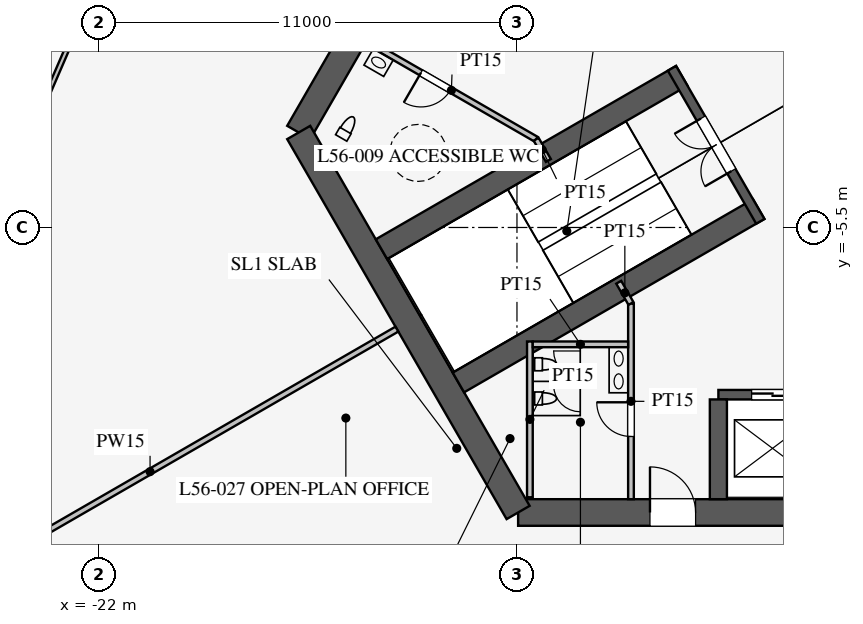
"""IFC4 building model, lengths in metres.
Left out: names, types, materials, properties, quantities, classifications, styles, units other than length and angle.
Written with IfcOpenShell. Run it as: python <this file> out.ifc"""

import sys

from ifc_helpers import new_model, si_unit, direction, frame, frame_2d, origin, place, context, subcontext, project, spatial, rectangle, extrude, element, fill, save


model = new_model("IFC4")
c1 = context("Model", 3, precision=1e-05, world=origin(), true_north=direction((0.0, 1.0)))
c2 = subcontext(c1, "Body", "Model", "MODEL_VIEW")
j1 = project(units=[si_unit("LENGTHUNIT", "METRE"), si_unit("PLANEANGLEUNIT", "RADIAN")], contexts=[c1])
p1 = place(None, origin())
s1 = spatial("IfcSite", under=j1, at=p1, CompositionType="ELEMENT")
p2 = place(p1, origin())
s2 = spatial("IfcBuilding", under=s1, at=p2, CompositionType="ELEMENT")
p3 = place(p2, frame((0.0, 0.0, 244.3)))
s3 = spatial("IfcBuildingStorey", under=s2, at=p3, CompositionType="ELEMENT", Elevation=244.3)
p4 = place(p3, frame((-10.97, -13.0, 0.0), z_axis=(0.0, 0.0, 1.0), x_axis=(1.0, 0.0, 0.0)))
e1 = element("IfcWall", 1, at=p4, inside=s3, PredefinedType="SHEAR", context=c2, shape_type="SweptSolid", body=[
    extrude(rectangle(XDim=21.939, YDim=0.7, at=frame_2d((10.97, 0.0))), origin(), (0.0, 0.0, 1.0), 4.2),
])
p5 = place(p4, frame((17.27, 0.0, 0.0)))
e2 = element("IfcOpeningElement", 2, at=p5, cuts=e1, PredefinedType="OPENING", context=c2, shape_type="SweptSolid", body=[
    extrude(rectangle(XDim=1.2, YDim=2.1, at=frame_2d((0.6, 1.05))), frame((0.0, 0.36, 0.0), z_axis=(0.0, -1.0, 0.0), x_axis=(1.0, 0.0, 0.0)), (0.0, 0.0, 1.0), 0.72),
])
p6 = place(p4, frame((3.47, 0.0, 0.0)))
e3 = element("IfcOpeningElement", 3, at=p6, cuts=e1, PredefinedType="OPENING", context=c2, shape_type="SweptSolid", body=[
    extrude(rectangle(XDim=1.2, YDim=2.1, at=frame_2d((0.6, 1.05))), frame((0.0, 0.36, 0.0), z_axis=(0.0, -1.0, 0.0), x_axis=(1.0, 0.0, 0.0)), (0.0, 0.0, 1.0), 0.72),
])
p7 = place(p3, frame((-5.773, 16.0, 0.0), z_axis=(0.0, 0.0, 1.0), x_axis=(-0.500002442456, -0.866023993627, 0.0)))
e4 = element("IfcWall", 4, at=p7, inside=s3, PredefinedType="SHEAR", context=c2, shape_type="SweptSolid", body=[
    extrude(rectangle(XDim=21.939, YDim=0.7, at=frame_2d((10.97, 0.0))), origin(), (0.0, 0.0, 1.0), 4.2),
])
p8 = place(p7, frame((17.27, 0.0, 0.0)))
e5 = element("IfcOpeningElement", 5, at=p8, cuts=e4, PredefinedType="OPENING", context=c2, shape_type="SweptSolid", body=[
    extrude(rectangle(XDim=1.2, YDim=2.1, at=frame_2d((0.6, 1.05))), frame((0.0, 0.36, 0.0), z_axis=(0.0, -1.0, 0.0), x_axis=(1.0, 0.0, 0.0)), (0.0, 0.0, 1.0), 0.72),
])
p9 = place(p7, frame((3.47, 0.0, 0.0)))
e6 = element("IfcOpeningElement", 6, at=p9, cuts=e4, PredefinedType="OPENING", context=c2, shape_type="SweptSolid", body=[
    extrude(rectangle(XDim=1.2, YDim=2.1, at=frame_2d((0.6, 1.05))), frame((0.0, 0.36, 0.0), z_axis=(0.0, -1.0, 0.0), x_axis=(1.0, 0.0, 0.0)), (0.0, 0.0, 1.0), 0.72),
])
p10 = place(p3, frame((-16.743, -3.0, 0.0), z_axis=(0.0, 0.0, 1.0), x_axis=(0.499995765644, -0.866027848477, 0.0)))
e7 = element("IfcWall", 7, at=p10, inside=s3, PredefinedType="SHEAR", context=c2, shape_type="SweptSolid", body=[
    extrude(rectangle(XDim=11.547, YDim=0.7, at=frame_2d((5.773, 0.0))), origin(), (0.0, 0.0, 1.0), 4.2),
])
p11 = place(p3, frame((-5.7, -9.9, 0.0), z_axis=(0.0, 0.0, 1.0), x_axis=(1.0, 0.0, 0.0)))
e8 = element("IfcWall", 8, at=p11, inside=s3, PredefinedType="SHEAR", context=c2, shape_type="SweptSolid", body=[
    extrude(rectangle(XDim=11.4, YDim=0.25, at=frame_2d((5.7, 0.0))), origin(), (0.0, 0.0, 1.0), 4.2),
])
p12 = place(p11, frame((0.875, 0.0, 0.0)))
e9 = element("IfcOpeningElement", 9, at=p12, cuts=e8, PredefinedType="OPENING", context=c2, shape_type="SweptSolid", body=[
    extrude(rectangle(XDim=1.1, YDim=2.2, at=frame_2d((0.55, 1.1))), frame((0.0, 0.135, 0.0), z_axis=(0.0, -1.0, 0.0), x_axis=(1.0, 0.0, 0.0)), (0.0, 0.0, 1.0), 0.27),
])
p13 = place(p11, frame((3.725, 0.0, 0.0)))
e10 = element("IfcOpeningElement", 10, at=p13, cuts=e8, PredefinedType="OPENING", context=c2, shape_type="SweptSolid", body=[
    extrude(rectangle(XDim=1.1, YDim=2.2, at=frame_2d((0.55, 1.1))), frame((0.0, 0.135, 0.0), z_axis=(0.0, -1.0, 0.0), x_axis=(1.0, 0.0, 0.0)), (0.0, 0.0, 1.0), 0.27),
])
p14 = place(p11, frame((6.575, 0.0, 0.0)))
e11 = element("IfcOpeningElement", 11, at=p14, cuts=e8, PredefinedType="OPENING", context=c2, shape_type="SweptSolid", body=[
    extrude(rectangle(XDim=1.1, YDim=2.2, at=frame_2d((0.55, 1.1))), frame((0.0, 0.135, 0.0), z_axis=(0.0, -1.0, 0.0), x_axis=(1.0, 0.0, 0.0)), (0.0, 0.0, 1.0), 0.27),
])
p15 = place(p11, frame((9.425, 0.0, 0.0)))
e12 = element("IfcOpeningElement", 12, at=p15, cuts=e8, PredefinedType="OPENING", context=c2, shape_type="SweptSolid", body=[
    extrude(rectangle(XDim=1.1, YDim=2.2, at=frame_2d((0.55, 1.1))), frame((0.0, 0.135, 0.0), z_axis=(0.0, -1.0, 0.0), x_axis=(1.0, 0.0, 0.0)), (0.0, 0.0, 1.0), 0.27),
])
p16 = place(p3, frame((-5.7, -10.025, 0.0), z_axis=(0.0, 0.0, 1.0), x_axis=(0.0, -1.0, 0.0)))
e13 = element("IfcWall", 13, at=p16, inside=s3, PredefinedType="SHEAR", context=c2, shape_type="SweptSolid", body=[
    extrude(rectangle(XDim=2.625, YDim=0.45, at=frame_2d((1.312, 0.0))), origin(), (0.0, 0.0, 1.0), 4.2),
])
for number, where, z_axis, x_axis in (
    (14, (-6.663, -1.509, 0.0), (0.0, 0.0, 1.0), (-0.866, -0.5, 0.0)),
    (15, (-4.638, -5.016, 0.0), (0.0, 0.0, 1.0), (-0.866, -0.5, 0.0)),
):
    element("IfcWall", number, at=place(p3, frame(where, z_axis=z_axis, x_axis=x_axis)), inside=s3, PredefinedType="SHEAR", context=c2, shape_type="SweptSolid", body=[
        extrude(rectangle(XDim=9.125, YDim=0.6, at=frame_2d((4.562, 0.0))), origin(), (0.0, 0.0, 1.0), 4.2),
    ])
p17 = place(p3, frame((-6.922, -1.312, 0.0), z_axis=(0.0, 0.0, 1.0), x_axis=(0.499984536904, -0.866034331223, 0.0)))
e16 = element("IfcWall", 16, at=p17, inside=s3, PredefinedType="SHEAR", context=c2, shape_type="SweptSolid", body=[
    extrude(rectangle(XDim=4.65, YDim=0.25, at=frame_2d((2.325, 0.0))), origin(), (0.0, 0.0, 1.0), 4.2),
])
p18 = place(p17, frame((1.525, 0.0, 0.0)))
e17 = element("IfcOpeningElement", 17, at=p18, cuts=e16, PredefinedType="OPENING", context=c2, shape_type="SweptSolid", body=[
    extrude(rectangle(XDim=1.6, YDim=2.1, at=frame_2d((0.8, 1.05))), frame((0.0, 0.135, 0.0), z_axis=(0.0, -1.0, 0.0), x_axis=(1.0, 0.0, 0.0)), (0.0, 0.0, 1.0), 0.27),
])
p19 = place(p3, frame((-8.0, -7.5, 0.0), z_axis=(0.0, 0.0, 1.0), x_axis=(0.0, -1.0, 0.0)))
e18 = element("IfcWall", 18, at=p19, inside=s3, PredefinedType="PARTITIONING", context=c2, shape_type="SweptSolid", body=[
    extrude(rectangle(XDim=5.15, YDim=0.15, at=frame_2d((2.575, 0.0))), origin(), (0.0, 0.0, 1.0), 4.0),
])
p20 = place(p19, frame((2.6, 0.0, 0.0)))
e19 = element("IfcOpeningElement", 19, at=p20, cuts=e18, PredefinedType="OPENING", context=c2, shape_type="SweptSolid", body=[
    extrude(rectangle(XDim=0.9, YDim=2.1, at=frame_2d((0.45, 1.05))), frame((0.0, 0.085, 0.0), z_axis=(0.0, -1.0, 0.0), x_axis=(1.0, 0.0, 0.0)), (0.0, 0.0, 1.0), 0.17),
])
p21 = place(p3, frame((-10.495, -3.178, 0.0), z_axis=(0.0, 0.0, 1.0), x_axis=(-0.866037967349, 0.499978238636, 0.0)))
e20 = element("IfcWall", 20, at=p21, inside=s3, PredefinedType="PARTITIONING", context=c2, shape_type="SweptSolid", body=[
    extrude(rectangle(XDim=5.15, YDim=0.15, at=frame_2d((2.575, 0.0))), origin(), (0.0, 0.0, 1.0), 4.0),
])
p22 = place(p21, frame((2.6, 0.0, 0.0)))
e21 = element("IfcOpeningElement", 21, at=p22, cuts=e20, PredefinedType="OPENING", context=c2, shape_type="SweptSolid", body=[
    extrude(rectangle(XDim=0.9, YDim=2.1, at=frame_2d((0.45, 1.05))), frame((0.0, 0.085, 0.0), z_axis=(0.0, -1.0, 0.0), x_axis=(1.0, 0.0, 0.0)), (0.0, 0.0, 1.0), 0.17),
])
for number, where, z_axis, x_axis in (
    (22, (-10.495, -3.178, 0.0), (0.0, 0.0, 1.0), (0.5, -0.866, 0.0)),
    (23, (-8.0, -7.5, 0.0), (0.0, 0.0, 1.0), (-0.5, 0.866, 0.0)),
):
    element("IfcWall", number, at=place(p3, frame(where, z_axis=z_axis, x_axis=x_axis)), inside=s3, PredefinedType="PARTITIONING", context=c2, shape_type="SweptSolid", body=[
        extrude(rectangle(XDim=0.645, YDim=0.15, at=frame_2d((0.323, 0.0))), origin(), (0.0, 0.0, 1.0), 4.0),
    ])
p23 = place(p3, frame((-10.66, -8.5, 0.0), z_axis=(0.0, 0.0, 1.0), x_axis=(0.0, -1.0, 0.0)))
e24 = element("IfcWall", 24, at=p23, inside=s3, PredefinedType="PARTITIONING", context=c2, shape_type="SweptSolid", body=[
    extrude(rectangle(XDim=4.1, YDim=0.15, at=frame_2d((2.05, 0.0))), origin(), (0.0, 0.0, 1.0), 4.0),
])
p24 = place(p3, frame((-8.075, -8.575, 0.0), z_axis=(0.0, 0.0, 1.0), x_axis=(-1.0, 0.0, 0.0)))
e25 = element("IfcWall", 25, at=p24, inside=s3, PredefinedType="PARTITIONING", context=c2, shape_type="SweptSolid", body=[
    extrude(rectangle(XDim=2.51, YDim=0.15, at=frame_2d((1.255, 0.0))), origin(), (0.0, 0.0, 1.0), 4.0),
])
p25 = place(p3, frame((-14.159, -8.175, 0.0), z_axis=(0.0, 0.0, 1.0), x_axis=(-0.866027028085, -0.499997186618, 0.0)))
e26 = element("IfcWall", 26, at=p25, inside=s3, PredefinedType="PARTITIONING", context=c2, shape_type="SweptSolid", body=[
    extrude(rectangle(XDim=15.0, YDim=0.15, at=frame_2d((7.5, 0.0))), origin(), (0.0, 0.0, 1.0), 2.4),
])
p26 = place(p3, frame((-21.592, 2.074, 0.0), z_axis=(0.0, 0.0, 1.0), x_axis=(-0.397208101111, -0.917728567939, 0.0)))
e27 = element("IfcWall", 27, at=p26, inside=s3, PredefinedType="PARTITIONING", context=c2, shape_type="SweptSolid", body=[
    extrude(rectangle(XDim=4.53, YDim=0.12, at=frame_2d((2.265, 0.0))), origin(), (0.0, 0.0, 1.0), 2.9),
])
p27 = place(p26, frame((1.8, 0.0, 0.15)))
e28 = element("IfcOpeningElement", 28, at=p27, cuts=e27, PredefinedType="OPENING", context=c2, shape_type="SweptSolid", body=[
    extrude(rectangle(XDim=0.9, YDim=2.1, at=frame_2d((0.45, 1.05))), frame((0.0, 0.07, 0.0), z_axis=(0.0, -1.0, 0.0), x_axis=(1.0, 0.0, 0.0)), (0.0, 0.0, 1.0), 0.14),
])
p28 = place(p20, frame((0.9, 0.0, 0.0), z_axis=(0.0, 0.0, 1.0), x_axis=(-1.0, 0.0, 0.0)))
e29 = element("IfcDoor", 29, at=p28, inside=s3, OperationType="SINGLE_SWING_RIGHT", PredefinedType="DOOR", context=c2, shape_type="SweptSolid", body=[
    extrude(rectangle(XDim=0.9, YDim=2.1, at=frame_2d((0.45, 1.05))), frame((0.0, 0.025, 0.0), z_axis=(0.0, -1.0, 0.0), x_axis=(1.0, 0.0, 0.0)), (0.0, 0.0, 1.0), 0.05),
])
fill(e19, e29)
p29 = place(p22, origin())
e30 = element("IfcDoor", 30, at=p29, inside=s3, OperationType="SINGLE_SWING_RIGHT", PredefinedType="DOOR", context=c2, shape_type="SweptSolid", body=[
    extrude(rectangle(XDim=0.9, YDim=2.1, at=frame_2d((0.45, 1.05))), frame((0.0, 0.025, 0.0), z_axis=(0.0, -1.0, 0.0), x_axis=(1.0, 0.0, 0.0)), (0.0, 0.0, 1.0), 0.05),
])
fill(e21, e30)
p30 = place(p18, frame((1.6, 0.0, 0.0), z_axis=(0.0, 0.0, 1.0), x_axis=(-1.0, 0.0, 0.0)))
e31 = element("IfcDoor", 31, at=p30, inside=s3, OperationType="DOUBLE_DOOR_SINGLE_SWING", PredefinedType="DOOR", context=c2, shape_type="SweptSolid", body=[
    extrude(rectangle(XDim=1.6, YDim=2.1, at=frame_2d((0.8, 1.05))), frame((0.0, 0.025, 0.0), z_axis=(0.0, -1.0, 0.0), x_axis=(1.0, 0.0, 0.0)), (0.0, 0.0, 1.0), 0.05),
])
fill(e17, e31)
p31 = place(p6, origin())
e32 = element("IfcDoor", 32, at=p31, inside=s3, OperationType="SINGLE_SWING_LEFT", PredefinedType="DOOR", context=c2, shape_type="SweptSolid", body=[
    extrude(rectangle(XDim=1.2, YDim=2.1, at=frame_2d((0.6, 1.05))), frame((0.0, 0.025, 0.0), z_axis=(0.0, -1.0, 0.0), x_axis=(1.0, 0.0, 0.0)), (0.0, 0.0, 1.0), 0.05),
])
fill(e3, e32)
p32 = place(p12, origin())
e33 = element("IfcDoor", 33, at=p32, inside=s3, OperationType="DOUBLE_DOOR_SLIDING", PredefinedType="DOOR", context=c2, shape_type="SweptSolid", body=[
    extrude(rectangle(XDim=1.1, YDim=2.2, at=frame_2d((0.55, 1.1))), frame((0.0, 0.025, 0.0), z_axis=(0.0, -1.0, 0.0), x_axis=(1.0, 0.0, 0.0)), (0.0, 0.0, 1.0), 0.05),
])
fill(e9, e33)
save(model, sys.argv[1])
